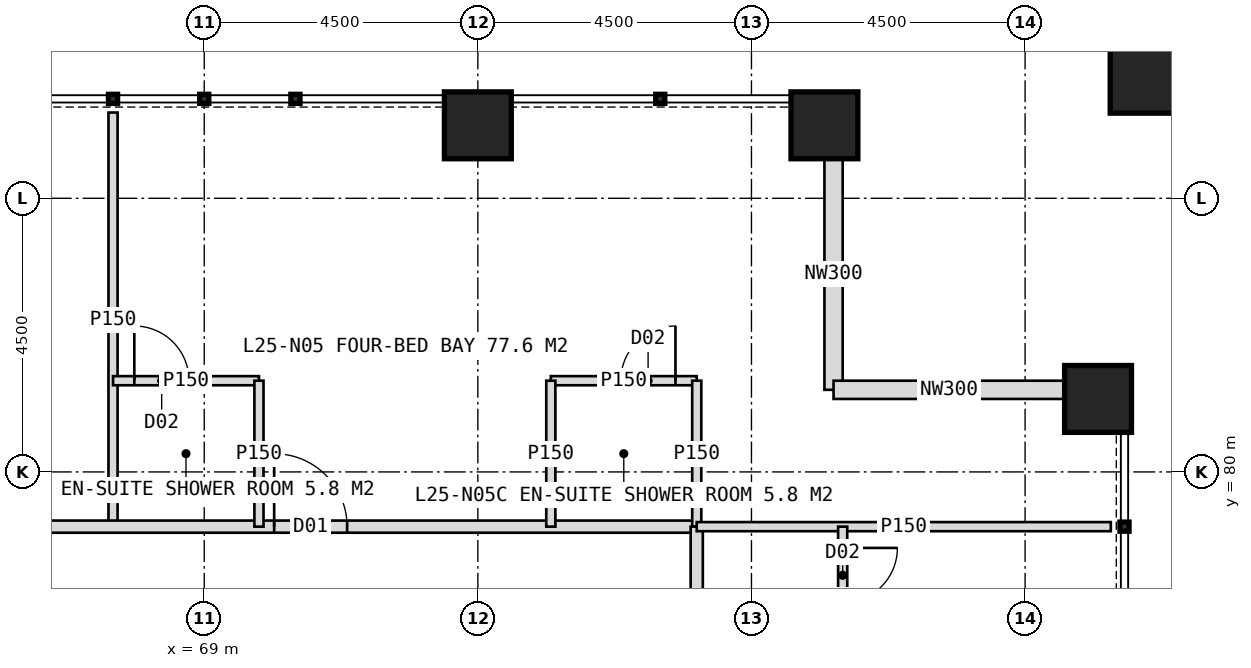
"""IFC4 building model, lengths in metres.
Left out: names, types, materials, properties, quantities, classifications, styles, units other than length and angle.
Written with IfcOpenShell. Run it as: python <this file> out.ifc"""

import sys

from ifc_helpers import new_model, si_unit, direction, frame, frame_2d, origin, origin_2d, place, context, subcontext, project, spatial, rectangle, hollow_rectangle, extrude, element, fill, save


model = new_model("IFC4")
c1 = context("Model", 3, precision=1e-05, world=origin(), true_north=direction((0.0, 1.0)))
c2 = subcontext(c1, "Body", "Model", "MODEL_VIEW")
j1 = project(units=[si_unit("LENGTHUNIT", "METRE"), si_unit("PLANEANGLEUNIT", "RADIAN")], contexts=[c1])
p1 = place(None, origin())
s1 = spatial("IfcSite", under=j1, at=p1, CompositionType="ELEMENT")
p2 = place(p1, origin())
s2 = spatial("IfcBuilding", under=s1, at=p2, CompositionType="ELEMENT")
p3 = place(p2, frame((0.0, 0.0, 108.0)))
s3 = spatial("IfcBuildingStorey", under=s2, at=p3, CompositionType="ELEMENT", Elevation=108.0)
for number, where, z_axis, x_axis in (
    (1, (73.5, 85.7, 0.0), (0.0, 0.0, 1.0), (1.0, 0.0, 0.0)),
    (2, (79.2, 85.7, 0.0), (0.0, 0.0, 1.0), (1.0, 0.0, 0.0)),
    (3, (83.7, 81.2, 0.0), (0.0, 0.0, 1.0), (1.0, 0.0, 0.0)),
):
    element("IfcColumn", number, at=place(p3, frame(where, z_axis=z_axis, x_axis=x_axis)), inside=s3, PredefinedType="COLUMN", context=c2, shape_type="SweptSolid", body=[
        extrude(hollow_rectangle(XDim=1.1, YDim=1.1, WallThickness=0.1, at=origin_2d()), origin(), (0.0, 0.0, 1.0), 4.0),
    ])
p4 = place(p3, frame((84.6, 86.6, 0.0), z_axis=(0.0, 0.0, 1.0), x_axis=(1.0, 0.0, 0.0)))
e4 = element("IfcColumn", 4, at=p4, inside=s3, PredefinedType="COLUMN", context=c2, shape_type="SweptSolid", body=[
    extrude(hollow_rectangle(XDim=1.4, YDim=1.4, WallThickness=0.08, at=origin_2d()), origin(), (0.0, 0.0, 1.0), 4.0),
])
for number, where, z_axis, x_axis in (
    (5, (79.35, 85.15, 0.0), (0.0, 0.0, 1.0), (0.0, -1.0, 0.0)),
    (6, (79.35, 81.35, 0.0), (0.0, 0.0, 1.0), (1.0, 0.0, 0.0)),
):
    element("IfcWall", number, at=place(p3, frame(where, z_axis=z_axis, x_axis=x_axis)), inside=s3, PredefinedType="ELEMENTEDWALL", context=c2, shape_type="SweptSolid", body=[
        extrude(rectangle(XDim=3.8, YDim=0.3, at=frame_2d((1.9, 0.0))), origin(), (0.0, 0.0, 1.0), 4.0),
    ])
p5 = place(p3, frame((67.5, 79.1, 0.0), z_axis=(0.0, 0.0, 1.0), x_axis=(0.0, 1.0, 0.0)))
e7 = element("IfcWall", 7, at=p5, inside=s3, PredefinedType="PARTITIONING", context=c2, shape_type="SweptSolid", body=[
    extrude(rectangle(XDim=6.81, YDim=0.15, at=frame_2d((3.405, 0.0))), origin(), (0.0, 0.0, 1.0), 3.75),
])
p6 = place(p3, frame((42.9, 79.1, 0.0), z_axis=(0.0, 0.0, 1.0), x_axis=(1.0, 0.0, 0.0)))
e8 = element("IfcWall", 8, at=p6, inside=s3, PredefinedType="PARTITIONING", context=c2, shape_type="SweptSolid", body=[
    extrude(rectangle(XDim=34.2, YDim=0.2, at=frame_2d((17.1, 0.0))), origin(), (0.0, 0.0, 1.0), 3.75),
])
p7 = place(p6, frame((3.25, 0.0, 0.0)))
e9 = element("IfcOpeningElement", 9, at=p7, cuts=e8, PredefinedType="OPENING", context=c2, shape_type="SweptSolid", body=[
    extrude(rectangle(XDim=1.2, YDim=2.2, at=frame_2d((0.6, 1.1))), frame((0.0, 0.11, 0.0), z_axis=(0.0, -1.0, 0.0), x_axis=(1.0, 0.0, 0.0)), (0.0, 0.0, 1.0), 0.22),
])
p8 = place(p6, frame((9.25, 0.0, 0.0)))
e10 = element("IfcOpeningElement", 10, at=p8, cuts=e8, PredefinedType="OPENING", context=c2, shape_type="SweptSolid", body=[
    extrude(rectangle(XDim=1.2, YDim=2.2, at=frame_2d((0.6, 1.1))), frame((0.0, 0.11, 0.0), z_axis=(0.0, -1.0, 0.0), x_axis=(1.0, 0.0, 0.0)), (0.0, 0.0, 1.0), 0.22),
])
p9 = place(p6, frame((13.75, 0.0, 0.0)))
e11 = element("IfcOpeningElement", 11, at=p9, cuts=e8, PredefinedType="OPENING", context=c2, shape_type="SweptSolid", body=[
    extrude(rectangle(XDim=1.2, YDim=2.2, at=frame_2d((0.6, 1.1))), frame((0.0, 0.11, 0.0), z_axis=(0.0, -1.0, 0.0), x_axis=(1.0, 0.0, 0.0)), (0.0, 0.0, 1.0), 0.22),
])
p10 = place(p6, frame((19.6, 0.0, 0.0)))
e12 = element("IfcOpeningElement", 12, at=p10, cuts=e8, PredefinedType="OPENING", context=c2, shape_type="SweptSolid", body=[
    extrude(rectangle(XDim=1.0, YDim=2.1, at=frame_2d((0.5, 1.05))), frame((0.0, 0.11, 0.0), z_axis=(0.0, -1.0, 0.0), x_axis=(1.0, 0.0, 0.0)), (0.0, 0.0, 1.0), 0.22),
])
p11 = place(p6, frame((27.25, 0.0, 0.0)))
e13 = element("IfcOpeningElement", 13, at=p11, cuts=e8, PredefinedType="OPENING", context=c2, shape_type="SweptSolid", body=[
    extrude(rectangle(XDim=1.2, YDim=2.2, at=frame_2d((0.6, 1.1))), frame((0.0, 0.11, 0.0), z_axis=(0.0, -1.0, 0.0), x_axis=(1.0, 0.0, 0.0)), (0.0, 0.0, 1.0), 0.22),
])
p12 = place(p3, frame((67.5, 81.5, 0.0), z_axis=(0.0, 0.0, 1.0), x_axis=(1.0, 0.0, 0.0)))
e14 = element("IfcWall", 14, at=p12, inside=s3, PredefinedType="PARTITIONING", context=c2, shape_type="SweptSolid", body=[
    extrude(rectangle(XDim=2.4, YDim=0.15, at=frame_2d((1.2, 0.0))), origin(), (0.0, 0.0, 1.0), 3.75),
])
p13 = place(p12, frame((0.35, 0.0, 0.0)))
e15 = element("IfcOpeningElement", 15, at=p13, cuts=e14, PredefinedType="OPENING", context=c2, shape_type="SweptSolid", body=[
    extrude(rectangle(XDim=0.9, YDim=2.1, at=frame_2d((0.45, 1.05))), frame((0.0, 0.085, 0.0), z_axis=(0.0, -1.0, 0.0), x_axis=(1.0, 0.0, 0.0)), (0.0, 0.0, 1.0), 0.17),
])
p14 = place(p3, frame((69.9, 79.1, 0.0), z_axis=(0.0, 0.0, 1.0), x_axis=(0.0, 1.0, 0.0)))
e16 = element("IfcWall", 16, at=p14, inside=s3, PredefinedType="PARTITIONING", context=c2, shape_type="SweptSolid", body=[
    extrude(rectangle(XDim=2.4, YDim=0.15, at=frame_2d((1.2, 0.0))), origin(), (0.0, 0.0, 1.0), 3.75),
])
p15 = place(p3, frame((74.7, 81.5, 0.0), z_axis=(0.0, 0.0, 1.0), x_axis=(1.0, 0.0, 0.0)))
e17 = element("IfcWall", 17, at=p15, inside=s3, PredefinedType="PARTITIONING", context=c2, shape_type="SweptSolid", body=[
    extrude(rectangle(XDim=2.4, YDim=0.15, at=frame_2d((1.2, 0.0))), origin(), (0.0, 0.0, 1.0), 3.75),
])
p16 = place(p15, frame((1.15, 0.0, 0.0)))
e18 = element("IfcOpeningElement", 18, at=p16, cuts=e17, PredefinedType="OPENING", context=c2, shape_type="SweptSolid", body=[
    extrude(rectangle(XDim=0.9, YDim=2.1, at=frame_2d((0.45, 1.05))), frame((0.0, 0.085, 0.0), z_axis=(0.0, -1.0, 0.0), x_axis=(1.0, 0.0, 0.0)), (0.0, 0.0, 1.0), 0.17),
])
for number, where, z_axis, x_axis in (
    (19, (74.7, 79.1, 0.0), (0.0, 0.0, 1.0), (0.0, 1.0, 0.0)),
    (20, (77.1, 79.1, 0.0), (0.0, 0.0, 1.0), (0.0, 1.0, 0.0)),
):
    element("IfcWall", number, at=place(p3, frame(where, z_axis=z_axis, x_axis=x_axis)), inside=s3, PredefinedType="PARTITIONING", context=c2, shape_type="SweptSolid", body=[
        extrude(rectangle(XDim=2.4, YDim=0.15, at=frame_2d((1.2, 0.0))), origin(), (0.0, 0.0, 1.0), 3.75),
    ])
p17 = place(p3, frame((77.1, 79.1, 0.0), z_axis=(0.0, 0.0, 1.0), x_axis=(0.0, -1.0, 0.0)))
e21 = element("IfcWall", 21, at=p17, inside=s3, PredefinedType="PARTITIONING", context=c2, shape_type="SweptSolid", body=[
    extrude(rectangle(XDim=34.2, YDim=0.2, at=frame_2d((17.1, 0.0))), origin(), (0.0, 0.0, 1.0), 3.75),
])
p18 = place(p17, frame((2.65, 0.0, 0.0)))
e22 = element("IfcOpeningElement", 22, at=p18, cuts=e21, PredefinedType="OPENING", context=c2, shape_type="SweptSolid", body=[
    extrude(rectangle(XDim=1.2, YDim=2.2, at=frame_2d((0.6, 1.1))), frame((0.0, 0.11, 0.0), z_axis=(0.0, -1.0, 0.0), x_axis=(1.0, 0.0, 0.0)), (0.0, 0.0, 1.0), 0.22),
])
p19 = place(p17, frame((10.75, 0.0, 0.0)))
e23 = element("IfcOpeningElement", 23, at=p19, cuts=e21, PredefinedType="OPENING", context=c2, shape_type="SweptSolid", body=[
    extrude(rectangle(XDim=1.2, YDim=2.2, at=frame_2d((0.6, 1.1))), frame((0.0, 0.11, 0.0), z_axis=(0.0, -1.0, 0.0), x_axis=(1.0, 0.0, 0.0)), (0.0, 0.0, 1.0), 0.22),
])
p20 = place(p17, frame((19.75, 0.0, 0.0)))
e24 = element("IfcOpeningElement", 24, at=p20, cuts=e21, PredefinedType="OPENING", context=c2, shape_type="SweptSolid", body=[
    extrude(rectangle(XDim=1.2, YDim=2.2, at=frame_2d((0.6, 1.1))), frame((0.0, 0.11, 0.0), z_axis=(0.0, -1.0, 0.0), x_axis=(1.0, 0.0, 0.0)), (0.0, 0.0, 1.0), 0.22),
])
p21 = place(p17, frame((25.75, 0.0, 0.0)))
e25 = element("IfcOpeningElement", 25, at=p21, cuts=e21, PredefinedType="OPENING", context=c2, shape_type="SweptSolid", body=[
    extrude(rectangle(XDim=1.2, YDim=2.2, at=frame_2d((0.6, 1.1))), frame((0.0, 0.11, 0.0), z_axis=(0.0, -1.0, 0.0), x_axis=(1.0, 0.0, 0.0)), (0.0, 0.0, 1.0), 0.22),
])
p22 = place(p17, frame((30.25, 0.0, 0.0)))
e26 = element("IfcOpeningElement", 26, at=p22, cuts=e21, PredefinedType="OPENING", context=c2, shape_type="SweptSolid", body=[
    extrude(rectangle(XDim=1.2, YDim=2.2, at=frame_2d((0.6, 1.1))), frame((0.0, 0.11, 0.0), z_axis=(0.0, -1.0, 0.0), x_axis=(1.0, 0.0, 0.0)), (0.0, 0.0, 1.0), 0.22),
])
p23 = place(p3, frame((77.1, 79.1, 0.0), z_axis=(0.0, 0.0, 1.0), x_axis=(1.0, 0.0, 0.0)))
e27 = element("IfcWall", 27, at=p23, inside=s3, PredefinedType="PARTITIONING", context=c2, shape_type="SweptSolid", body=[
    extrude(rectangle(XDim=6.81, YDim=0.15, at=frame_2d((3.405, 0.0))), origin(), (0.0, 0.0, 1.0), 3.75),
])
p24 = place(p3, frame((79.5, 79.1, 0.0), z_axis=(0.0, 0.0, 1.0), x_axis=(0.0, -1.0, 0.0)))
e28 = element("IfcWall", 28, at=p24, inside=s3, PredefinedType="PARTITIONING", context=c2, shape_type="SweptSolid", body=[
    extrude(rectangle(XDim=2.4, YDim=0.15, at=frame_2d((1.2, 0.0))), origin(), (0.0, 0.0, 1.0), 3.75),
])
p25 = place(p24, frame((0.35, 0.0, 0.0)))
e29 = element("IfcOpeningElement", 29, at=p25, cuts=e28, PredefinedType="OPENING", context=c2, shape_type="SweptSolid", body=[
    extrude(rectangle(XDim=0.9, YDim=2.1, at=frame_2d((0.45, 1.05))), frame((0.0, 0.085, 0.0), z_axis=(0.0, -1.0, 0.0), x_axis=(1.0, 0.0, 0.0)), (0.0, 0.0, 1.0), 0.17),
])
p26 = place(p11, origin())
e30 = element("IfcDoor", 30, at=p26, inside=s3, OperationType="SINGLE_SWING_LEFT", PredefinedType="DOOR", context=c2, shape_type="SweptSolid", body=[
    extrude(rectangle(XDim=1.2, YDim=2.2, at=frame_2d((0.6, 1.1))), frame((0.0, 0.025, 0.0), z_axis=(0.0, -1.0, 0.0), x_axis=(1.0, 0.0, 0.0)), (0.0, 0.0, 1.0), 0.05),
])
fill(e13, e30)
p27 = place(p13, origin())
e31 = element("IfcDoor", 31, at=p27, inside=s3, OperationType="SINGLE_SWING_LEFT", PredefinedType="DOOR", context=c2, shape_type="SweptSolid", body=[
    extrude(rectangle(XDim=0.9, YDim=2.1, at=frame_2d((0.45, 1.05))), frame((0.0, 0.025, 0.0), z_axis=(0.0, -1.0, 0.0), x_axis=(1.0, 0.0, 0.0)), (0.0, 0.0, 1.0), 0.05),
])
fill(e15, e31)
p28 = place(p16, origin())
e32 = element("IfcDoor", 32, at=p28, inside=s3, OperationType="SINGLE_SWING_RIGHT", PredefinedType="DOOR", context=c2, shape_type="SweptSolid", body=[
    extrude(rectangle(XDim=0.9, YDim=2.1, at=frame_2d((0.45, 1.05))), frame((0.0, 0.025, 0.0), z_axis=(0.0, -1.0, 0.0), x_axis=(1.0, 0.0, 0.0)), (0.0, 0.0, 1.0), 0.05),
])
fill(e18, e32)
p29 = place(p25, origin())
e33 = element("IfcDoor", 33, at=p29, inside=s3, OperationType="SINGLE_SWING_LEFT", PredefinedType="DOOR", context=c2, shape_type="SweptSolid", body=[
    extrude(rectangle(XDim=0.9, YDim=2.1, at=frame_2d((0.45, 1.05))), frame((0.0, 0.025, 0.0), z_axis=(0.0, -1.0, 0.0), x_axis=(1.0, 0.0, 0.0)), (0.0, 0.0, 1.0), 0.05),
])
fill(e29, e33)
save(model, sys.argv[1])
